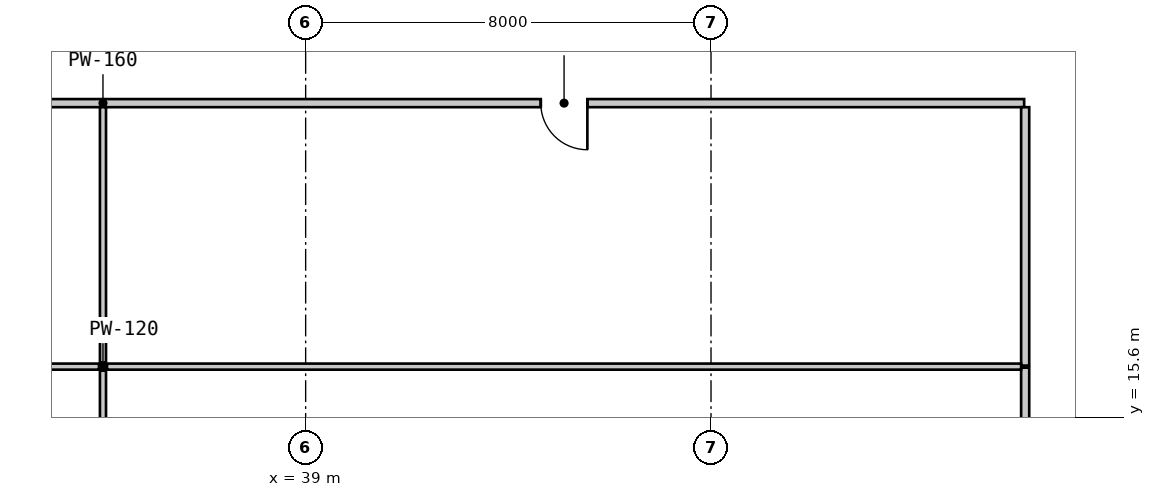
"""IFC4 building model, lengths in metres.
Left out: names, types, materials, properties, quantities, classifications, styles, units other than length and angle.
Written with IfcOpenShell. Run it as: python <this file> out.ifc"""

import sys

from ifc_helpers import new_model, si_unit, direction, frame, frame_2d, origin, place, context, subcontext, project, spatial, rectangle, extrude, source, transform, mapped, element, fill, save


model = new_model("IFC4")
c1 = context("Model", 3, precision=1e-05, world=origin(), true_north=direction((0.0, 1.0)))
c2 = subcontext(c1, "Body", "Model", "MODEL_VIEW")
j1 = project(units=[si_unit("LENGTHUNIT", "METRE"), si_unit("PLANEANGLEUNIT", "RADIAN")], contexts=[c1])
p1 = place(None, origin())
s1 = spatial("IfcSite", under=j1, at=p1, CompositionType="ELEMENT")
p2 = place(p1, origin())
s2 = spatial("IfcBuilding", under=s1, at=p2, CompositionType="ELEMENT")
p3 = place(p2, frame((0.0, 0.0, 74.55)))
s3 = spatial("IfcBuildingStorey", under=s2, at=p3, CompositionType="ELEMENT", Elevation=74.55)
m1 = source(origin(), c2, "Body", "SweptSolid", [
    extrude(rectangle(XDim=18.159, YDim=0.16, at=frame_2d((9.08, 0.0))), origin(), (0.0, 0.0, 1.0), 2.93),
])
p4 = place(p3, frame((34.98, 21.8, 0.0), z_axis=(0.0, 0.0, 1.0), x_axis=(-1.0, 0.0, 0.0)))
e1 = element("IfcWall", 1, at=p4, inside=s3, PredefinedType="PARTITIONING", context=c2, shape_type="MappedRepresentation", body=[
    mapped(m1, transform((0.0, 0.0, 0.0), scale=1.0)),
])
m2 = source(origin(), c2, "Body", "SweptSolid", [
    extrude(rectangle(XDim=0.92, YDim=2.1, at=frame_2d((0.46, 1.05))), frame((0.0, 0.09, 0.0), z_axis=(0.0, -1.0, 0.0), x_axis=(1.0, 0.0, 0.0)), (0.0, 0.0, 1.0), 0.18),
])
p5 = place(p4, frame((8.62, 0.0, 0.0)))
e2 = element("IfcOpeningElement", 2, at=p5, cuts=e1, PredefinedType="OPENING", context=c2, shape_type="MappedRepresentation", body=[
    mapped(m2, transform((0.0, 0.0, 0.0), scale=1.0)),
])
m3 = source(origin(), c2, "Body", "SweptSolid", [
    extrude(rectangle(XDim=5.16, YDim=0.16, at=frame_2d((2.58, 0.0))), origin(), (0.0, 0.0, 1.0), 2.93),
])
p6 = place(p3, frame((53.2, 11.42, 0.0), z_axis=(0.0, 0.0, 1.0), x_axis=(0.0, 1.0, 0.0)))
e3 = element("IfcWall", 3, at=p6, inside=s3, PredefinedType="PARTITIONING", context=c2, shape_type="MappedRepresentation", body=[
    mapped(m3, transform((0.0, 0.0, 0.0), scale=1.0)),
])
p7 = place(p3, frame((53.18, 21.8, 0.0), z_axis=(0.0, 0.0, 1.0), x_axis=(-1.0, 0.0, 0.0)))
e4 = element("IfcWall", 4, at=p7, inside=s3, PredefinedType="PARTITIONING", context=c2, shape_type="MappedRepresentation", body=[
    mapped(m1, transform((0.0, 0.0, 0.0), scale=1.0)),
])
p8 = place(p7, frame((8.62, 0.0, 0.0)))
e5 = element("IfcOpeningElement", 5, at=p8, cuts=e4, PredefinedType="OPENING", context=c2, shape_type="MappedRepresentation", body=[
    mapped(m2, transform((0.0, 0.0, 0.0), scale=1.0)),
])
m4 = source(origin(), c2, "Body", "SweptSolid", [
    extrude(rectangle(XDim=5.1, YDim=0.16, at=frame_2d((2.55, 0.0))), origin(), (0.0, 0.0, 1.0), 2.93),
])
p9 = place(p3, frame((53.2, 16.62, 0.0), z_axis=(0.0, 0.0, 1.0), x_axis=(0.0, 1.0, 0.0)))
e6 = element("IfcWall", 6, at=p9, inside=s3, PredefinedType="PARTITIONING", context=c2, shape_type="MappedRepresentation", body=[
    mapped(m4, transform((0.0, 0.0, 0.0), scale=1.0)),
])
m5 = source(origin(), c2, "Body", "SweptSolid", [
    extrude(rectangle(XDim=18.04, YDim=0.12, at=frame_2d((9.02, 0.0))), origin(), (0.0, 0.0, 1.0), 2.93),
])
p10 = place(p3, frame((16.88, 16.6, 0.0), z_axis=(0.0, 0.0, 1.0), x_axis=(1.0, 0.0, 0.0)))
e7 = element("IfcWall", 7, at=p10, inside=s3, PredefinedType="PARTITIONING", context=c2, shape_type="MappedRepresentation", body=[
    mapped(m5, transform((0.0, 0.0, 0.0), scale=1.0)),
])
m6 = source(origin(), c2, "Body", "SweptSolid", [
    extrude(rectangle(XDim=5.04, YDim=0.12, at=frame_2d((2.52, 0.0))), origin(), (0.0, 0.0, 1.0), 2.93),
])
for number, where, z_axis, x_axis in (
    (8, (35.0, 16.52, 0.0), (0.0, 0.0, 1.0), (0.0, -1.0, 0.0)),
    (9, (35.0, 21.72, 0.0), (0.0, 0.0, 1.0), (0.0, -1.0, 0.0)),
):
    element("IfcWall", number, at=place(p3, frame(where, z_axis=z_axis, x_axis=x_axis)), inside=s3, PredefinedType="PARTITIONING", context=c2, shape_type="MappedRepresentation", body=[
        mapped(m6, transform((0.0, 0.0, 0.0), scale=1.0)),
    ])
p11 = place(p3, frame((35.08, 16.6, 0.0), z_axis=(0.0, 0.0, 1.0), x_axis=(1.0, 0.0, 0.0)))
e10 = element("IfcWall", 10, at=p11, inside=s3, PredefinedType="PARTITIONING", context=c2, shape_type="MappedRepresentation", body=[
    mapped(m5, transform((0.0, 0.0, 0.0), scale=1.0)),
])
m7 = source(origin(), c2, "Body", "SweptSolid", [
    extrude(rectangle(XDim=0.92, YDim=2.1, at=frame_2d((0.46, 1.05))), frame((0.0, 0.025, 0.0), z_axis=(0.0, -1.0, 0.0), x_axis=(1.0, 0.0, 0.0)), (0.0, 0.0, 1.0), 0.05),
])
p12 = place(p8, origin())
e11 = element("IfcDoor", 11, at=p12, inside=s3, OperationType="SINGLE_SWING_LEFT", PredefinedType="DOOR", context=c2, shape_type="MappedRepresentation", body=[
    mapped(m7, transform((0.0, 0.0, 0.0), scale=1.0)),
])
fill(e5, e11)
save(model, sys.argv[1])
